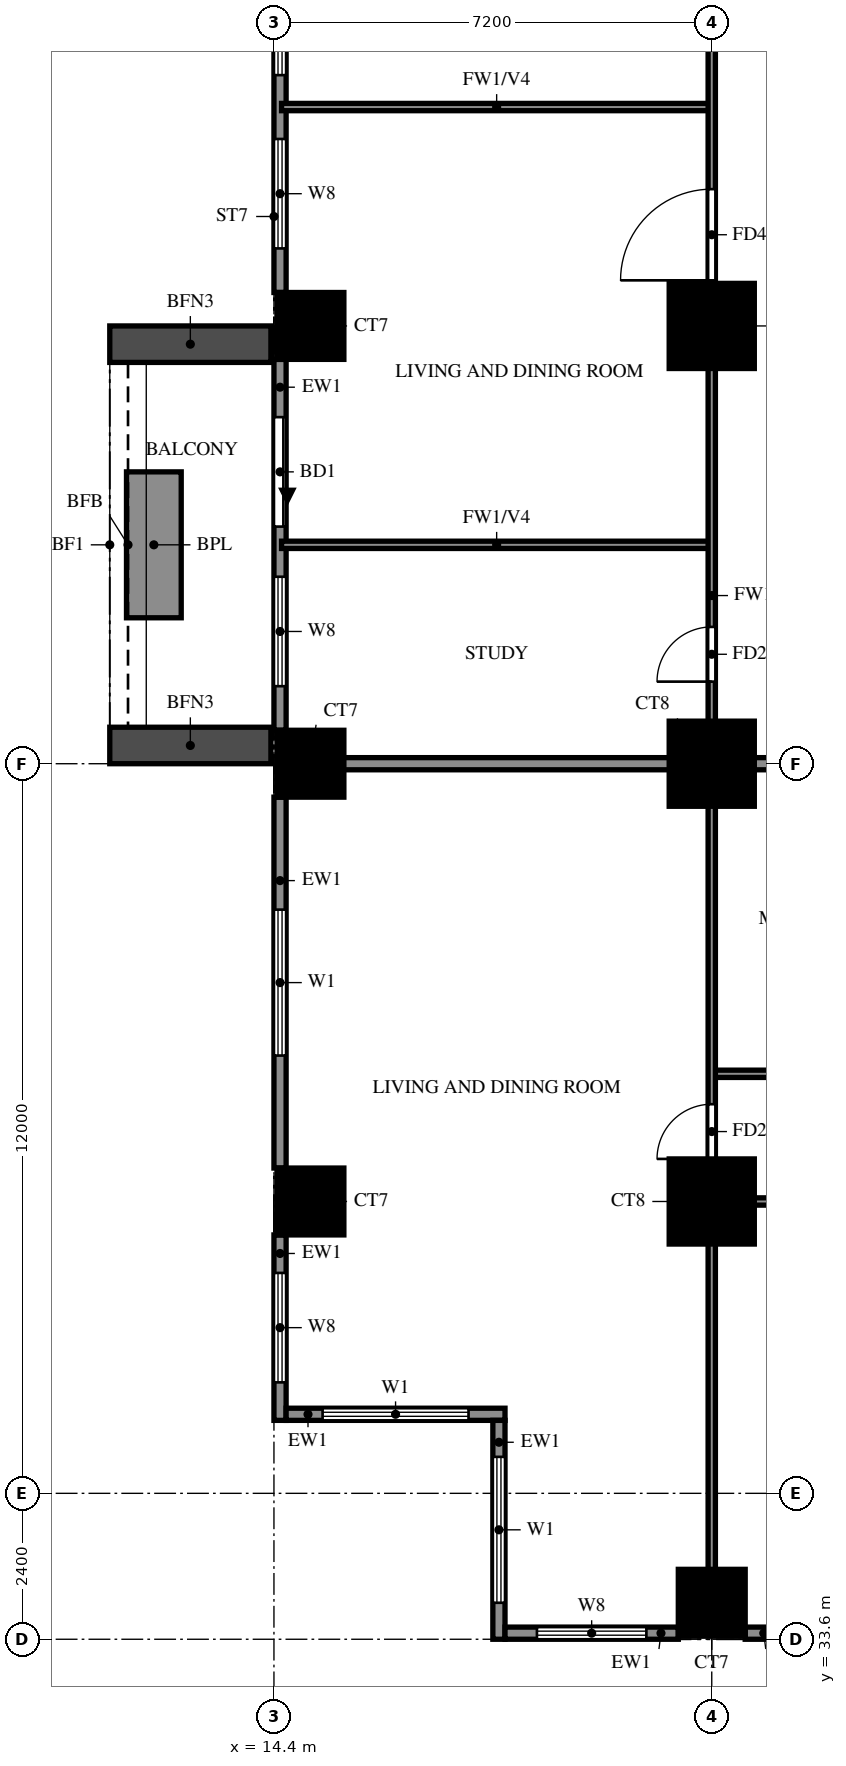
"""IFC4 building model, lengths in metres.
Left out: names, types, materials, properties, quantities, classifications, styles, units other than length and angle.
Written with IfcOpenShell. Run it as: python <this file> out.ifc"""

import sys

from ifc_helpers import new_model, si_unit, direction, frame, frame_2d, origin, origin_2d, place, context, subcontext, project, spatial, rectangle, extrude, source, transform, mapped, element, fill, save


model = new_model("IFC4")
c1 = context("Model", 3, precision=1e-05, world=origin(), true_north=direction((0.0, 1.0)))
c2 = subcontext(c1, "Body", "Model", "MODEL_VIEW")
j1 = project(units=[si_unit("LENGTHUNIT", "METRE"), si_unit("PLANEANGLEUNIT", "RADIAN")], contexts=[c1])
p1 = place(None, origin())
s1 = spatial("IfcSite", under=j1, at=p1, CompositionType="ELEMENT")
p2 = place(p1, origin())
s2 = spatial("IfcBuilding", under=s1, at=p2, CompositionType="ELEMENT")
p3 = place(p2, frame((0.0, 0.0, 37.5)))
s3 = spatial("IfcBuildingStorey", under=s2, at=p3, CompositionType="ELEMENT", Elevation=37.5)
m1 = source(origin(), c2, "Body", "SweptSolid", [
    extrude(rectangle(XDim=1.1, YDim=1.1, at=origin_2d()), origin(), (0.0, 0.0, 1.0), 3.18),
])
for number, where, z_axis, x_axis in (
    (1, (21.6, 34.2, 0.0), (0.0, 0.0, 1.0), (1.0, 0.0, 0.0)),
    (2, (15.0, 40.8, 0.0), (0.0, 0.0, 1.0), (1.0, 0.0, 0.0)),
):
    element("IfcColumn", number, at=place(p3, frame(where, z_axis=z_axis, x_axis=x_axis)), inside=s3, PredefinedType="COLUMN", context=c2, shape_type="MappedRepresentation", body=[
        mapped(m1, transform((0.0, 0.0, 0.0))),
    ])
m2 = source(origin(), c2, "Body", "SweptSolid", [
    extrude(rectangle(XDim=1.4, YDim=1.4, at=origin_2d()), origin(), (0.0, 0.0, 1.0), 3.18),
])
p4 = place(p3, frame((21.6, 40.8, 0.0), z_axis=(0.0, 0.0, 1.0), x_axis=(1.0, 0.0, 0.0)))
e3 = element("IfcColumn", 3, at=p4, inside=s3, PredefinedType="COLUMN", context=c2, shape_type="MappedRepresentation", body=[
    mapped(m2, transform((0.0, 0.0, 0.0))),
])
p5 = place(p3, frame((15.0, 48.0, 0.0), z_axis=(0.0, 0.0, 1.0), x_axis=(1.0, 0.0, 0.0)))
e4 = element("IfcColumn", 4, at=p5, inside=s3, PredefinedType="COLUMN", context=c2, shape_type="MappedRepresentation", body=[
    mapped(m1, transform((0.0, 0.0, 0.0))),
])
p6 = place(p3, frame((21.6, 48.0, 0.0), z_axis=(0.0, 0.0, 1.0), x_axis=(1.0, 0.0, 0.0)))
e5 = element("IfcColumn", 5, at=p6, inside=s3, PredefinedType="COLUMN", context=c2, shape_type="MappedRepresentation", body=[
    mapped(m2, transform((0.0, 0.0, 0.0))),
])
p7 = place(p3, frame((15.0, 55.2, 0.0), z_axis=(0.0, 0.0, 1.0), x_axis=(1.0, 0.0, 0.0)))
e6 = element("IfcColumn", 6, at=p7, inside=s3, PredefinedType="COLUMN", context=c2, shape_type="MappedRepresentation", body=[
    mapped(m1, transform((0.0, 0.0, 0.0))),
])
p8 = place(p3, frame((21.6, 55.2, 0.0), z_axis=(0.0, 0.0, 1.0), x_axis=(1.0, 0.0, 0.0)))
e7 = element("IfcColumn", 7, at=p8, inside=s3, PredefinedType="COLUMN", context=c2, shape_type="MappedRepresentation", body=[
    mapped(m2, transform((0.0, 0.0, 0.0))),
])
p9 = place(p3, frame((14.5, 61.85, 0.0), z_axis=(0.0, 0.0, 1.0), x_axis=(0.0, -1.0, 0.0)))
e8 = element("IfcWall", 8, at=p9, inside=s3, PredefinedType="SOLIDWALL", context=c2, shape_type="SweptSolid", body=[
    extrude(rectangle(XDim=6.1, YDim=0.2, at=frame_2d((3.05, 0.0))), origin(), (0.0, 0.0, 1.0), 3.18),
])
p10 = place(p9, frame((3.575, 0.0, 0.6)))
e9 = element("IfcOpeningElement", 9, at=p10, cuts=e8, PredefinedType="OPENING", context=c2, shape_type="SweptSolid", body=[
    extrude(rectangle(XDim=1.8, YDim=2.4, at=frame_2d((0.9, 1.2))), frame((0.0, 0.11, 0.0), z_axis=(0.0, -1.0, 0.0), x_axis=(1.0, 0.0, 0.0)), (0.0, 0.0, 1.0), 0.22),
])
p11 = place(p9, frame((0.725, 0.0, 0.6)))
e10 = element("IfcOpeningElement", 10, at=p11, cuts=e8, PredefinedType="OPENING", context=c2, shape_type="SweptSolid", body=[
    extrude(rectangle(XDim=1.8, YDim=2.4, at=frame_2d((0.9, 1.2))), frame((0.0, 0.11, 0.0), z_axis=(0.0, -1.0, 0.0), x_axis=(1.0, 0.0, 0.0)), (0.0, 0.0, 1.0), 0.22),
])
p12 = place(p3, frame((14.5, 54.65, 0.0), z_axis=(0.0, 0.0, 1.0), x_axis=(0.0, -1.0, 0.0)))
e11 = element("IfcWall", 11, at=p12, inside=s3, PredefinedType="SOLIDWALL", context=c2, shape_type="SweptSolid", body=[
    extrude(rectangle(XDim=6.1, YDim=0.2, at=frame_2d((3.05, 0.0))), origin(), (0.0, 0.0, 1.0), 3.18),
])
p13 = place(p12, frame((0.95, 0.0, 0.0)))
e12 = element("IfcOpeningElement", 12, at=p13, cuts=e11, PredefinedType="OPENING", context=c2, shape_type="SweptSolid", body=[
    extrude(rectangle(XDim=1.8, YDim=2.4, at=frame_2d((0.9, 1.2))), frame((0.0, 0.11, 0.0), z_axis=(0.0, -1.0, 0.0), x_axis=(1.0, 0.0, 0.0)), (0.0, 0.0, 1.0), 0.22),
])
p14 = place(p12, frame((3.575, 0.0, 0.6)))
e13 = element("IfcOpeningElement", 13, at=p14, cuts=e11, PredefinedType="OPENING", context=c2, shape_type="SweptSolid", body=[
    extrude(rectangle(XDim=1.8, YDim=2.4, at=frame_2d((0.9, 1.2))), frame((0.0, 0.11, 0.0), z_axis=(0.0, -1.0, 0.0), x_axis=(1.0, 0.0, 0.0)), (0.0, 0.0, 1.0), 0.22),
])
p15 = place(p3, frame((14.5, 47.45, 0.0), z_axis=(0.0, 0.0, 1.0), x_axis=(0.0, -1.0, 0.0)))
e14 = element("IfcWall", 14, at=p15, inside=s3, PredefinedType="SOLIDWALL", context=c2, shape_type="SweptSolid", body=[
    extrude(rectangle(XDim=6.1, YDim=0.2, at=frame_2d((3.05, 0.0))), origin(), (0.0, 0.0, 1.0), 3.18),
])
p16 = place(p15, frame((1.85, 0.0, 0.6)))
e15 = element("IfcOpeningElement", 15, at=p16, cuts=e14, PredefinedType="OPENING", context=c2, shape_type="SweptSolid", body=[
    extrude(rectangle(XDim=2.4, YDim=2.4, at=frame_2d((1.2, 1.2))), frame((0.0, 0.11, 0.0), z_axis=(0.0, -1.0, 0.0), x_axis=(1.0, 0.0, 0.0)), (0.0, 0.0, 1.0), 0.22),
])
p17 = place(p3, frame((14.5, 40.25, 0.0), z_axis=(0.0, 0.0, 1.0), x_axis=(0.0, -1.0, 0.0)))
e16 = element("IfcWall", 16, at=p17, inside=s3, PredefinedType="SOLIDWALL", context=c2, shape_type="SweptSolid", body=[
    extrude(rectangle(XDim=3.05, YDim=0.2, at=frame_2d((1.525, 0.0))), origin(), (0.0, 0.0, 1.0), 3.18),
])
p18 = place(p17, frame((0.625, 0.0, 0.6)))
e17 = element("IfcOpeningElement", 17, at=p18, cuts=e16, PredefinedType="OPENING", context=c2, shape_type="SweptSolid", body=[
    extrude(rectangle(XDim=1.8, YDim=2.4, at=frame_2d((0.9, 1.2))), frame((0.0, 0.11, 0.0), z_axis=(0.0, -1.0, 0.0), x_axis=(1.0, 0.0, 0.0)), (0.0, 0.0, 1.0), 0.22),
])
p19 = place(p3, frame((14.6, 37.3, 0.0), z_axis=(0.0, 0.0, 1.0), x_axis=(1.0, 0.0, 0.0)))
e18 = element("IfcWall", 18, at=p19, inside=s3, PredefinedType="SOLIDWALL", context=c2, shape_type="SweptSolid", body=[
    extrude(rectangle(XDim=3.6, YDim=0.2, at=frame_2d((1.8, 0.0))), origin(), (0.0, 0.0, 1.0), 3.18),
])
p20 = place(p19, frame((0.6, 0.0, 0.6)))
e19 = element("IfcOpeningElement", 19, at=p20, cuts=e18, PredefinedType="OPENING", context=c2, shape_type="SweptSolid", body=[
    extrude(rectangle(XDim=2.4, YDim=2.4, at=frame_2d((1.2, 1.2))), frame((0.0, 0.11, 0.0), z_axis=(0.0, -1.0, 0.0), x_axis=(1.0, 0.0, 0.0)), (0.0, 0.0, 1.0), 0.22),
])
p21 = place(p3, frame((18.1, 37.2, 0.0), z_axis=(0.0, 0.0, 1.0), x_axis=(0.0, -1.0, 0.0)))
e20 = element("IfcWall", 20, at=p21, inside=s3, PredefinedType="SOLIDWALL", context=c2, shape_type="SweptSolid", body=[
    extrude(rectangle(XDim=3.6, YDim=0.2, at=frame_2d((1.8, 0.0))), origin(), (0.0, 0.0, 1.0), 3.18),
])
p22 = place(p21, frame((0.6, 0.0, 0.6)))
e21 = element("IfcOpeningElement", 21, at=p22, cuts=e20, PredefinedType="OPENING", context=c2, shape_type="SweptSolid", body=[
    extrude(rectangle(XDim=2.4, YDim=2.4, at=frame_2d((1.2, 1.2))), frame((0.0, 0.11, 0.0), z_axis=(0.0, -1.0, 0.0), x_axis=(1.0, 0.0, 0.0)), (0.0, 0.0, 1.0), 0.22),
])
p23 = place(p3, frame((18.2, 33.7, 0.0), z_axis=(0.0, 0.0, 1.0), x_axis=(1.0, 0.0, 0.0)))
e22 = element("IfcWall", 22, at=p23, inside=s3, PredefinedType="SOLIDWALL", context=c2, shape_type="SweptSolid", body=[
    extrude(rectangle(XDim=2.85, YDim=0.2, at=frame_2d((1.425, 0.0))), origin(), (0.0, 0.0, 1.0), 3.18),
])
p24 = place(p23, frame((0.525, 0.0, 0.6)))
e23 = element("IfcOpeningElement", 23, at=p24, cuts=e22, PredefinedType="OPENING", context=c2, shape_type="SweptSolid", body=[
    extrude(rectangle(XDim=1.8, YDim=2.4, at=frame_2d((0.9, 1.2))), frame((0.0, 0.11, 0.0), z_axis=(0.0, -1.0, 0.0), x_axis=(1.0, 0.0, 0.0)), (0.0, 0.0, 1.0), 0.22),
])
p25 = place(p3, frame((22.15, 33.7, 0.0), z_axis=(0.0, 0.0, 1.0), x_axis=(1.0, 0.0, 0.0)))
e24 = element("IfcWall", 24, at=p25, inside=s3, PredefinedType="SOLIDWALL", context=c2, shape_type="SweptSolid", body=[
    extrude(rectangle(XDim=6.1, YDim=0.2, at=frame_2d((3.05, 0.0))), origin(), (0.0, 0.0, 1.0), 3.18),
])
p26 = place(p25, frame((0.725, 0.0, 0.6)))
e25 = element("IfcOpeningElement", 25, at=p26, cuts=e24, PredefinedType="OPENING", context=c2, shape_type="SweptSolid", body=[
    extrude(rectangle(XDim=1.8, YDim=2.4, at=frame_2d((0.9, 1.2))), frame((0.0, 0.11, 0.0), z_axis=(0.0, -1.0, 0.0), x_axis=(1.0, 0.0, 0.0)), (0.0, 0.0, 1.0), 0.22),
])
p27 = place(p25, frame((3.575, 0.0, 0.6)))
e26 = element("IfcOpeningElement", 26, at=p27, cuts=e24, PredefinedType="OPENING", context=c2, shape_type="SweptSolid", body=[
    extrude(rectangle(XDim=1.8, YDim=2.4, at=frame_2d((0.9, 1.2))), frame((0.0, 0.11, 0.0), z_axis=(0.0, -1.0, 0.0), x_axis=(1.0, 0.0, 0.0)), (0.0, 0.0, 1.0), 0.22),
])
for number, where, z_axis, x_axis in (
    (27, (14.35, 54.9, 0.0), (0.0, 0.0, 1.0), (-1.0, 0.0, 0.0)),
    (28, (14.35, 48.3, 0.0), (0.0, 0.0, 1.0), (-1.0, 0.0, 0.0)),
):
    element("IfcWall", number, at=place(p3, frame(where, z_axis=z_axis, x_axis=x_axis)), inside=s3, PredefinedType="SOLIDWALL", context=c2, shape_type="SweptSolid", body=[
        extrude(rectangle(XDim=2.65, YDim=0.6, at=frame_2d((1.325, 0.0))), origin(), (0.0, 0.0, 1.0), 2.85),
    ])
p28 = place(p3, frame((12.425, 52.8, 0.0), z_axis=(0.0, 0.0, 1.0), x_axis=(0.0, -1.0, 0.0)))
e29 = element("IfcWall", 29, at=p28, inside=s3, PredefinedType="SOLIDWALL", context=c2, shape_type="SweptSolid", body=[
    extrude(rectangle(XDim=2.4, YDim=0.9, at=frame_2d((1.2, 0.0))), origin(), (0.0, 0.0, 1.0), 0.9),
])
p29 = place(p3, frame((14.525, 48.0, 0.0), z_axis=(0.0, 0.0, 1.0), x_axis=(1.0, 0.0, 0.0)))
e30 = element("IfcWall", 30, at=p29, inside=s3, PredefinedType="SOLIDWALL", context=c2, shape_type="SweptSolid", body=[
    extrude(rectangle(XDim=19.075, YDim=0.2, at=frame_2d((9.538, 0.0))), origin(), (0.0, 0.0, 1.0), 3.18),
])
p30 = place(p3, frame((21.6, 40.8, 0.0), z_axis=(0.0, 0.0, 1.0), x_axis=(1.0, 0.0, 0.0)))
e31 = element("IfcWall", 31, at=p30, inside=s3, PredefinedType="PARTITIONING", context=c2, shape_type="SweptSolid", body=[
    extrude(rectangle(XDim=7.2, YDim=0.12, at=frame_2d((3.6, 0.0))), origin(), (0.0, 0.0, 1.0), 3.18),
])
p31 = place(p30, frame((1.35, 0.0, 0.0)))
e32 = element("IfcOpeningElement", 32, at=p31, cuts=e31, PredefinedType="OPENING", context=c2, shape_type="SweptSolid", body=[
    extrude(rectangle(XDim=0.9, YDim=2.1, at=frame_2d((0.45, 1.05))), frame((0.0, 0.07, 0.0), z_axis=(0.0, -1.0, 0.0), x_axis=(1.0, 0.0, 0.0)), (0.0, 0.0, 1.0), 0.14),
])
p32 = place(p30, frame((4.95, 0.0, 0.0)))
e33 = element("IfcOpeningElement", 33, at=p32, cuts=e31, PredefinedType="OPENING", context=c2, shape_type="SweptSolid", body=[
    extrude(rectangle(XDim=0.9, YDim=2.1, at=frame_2d((0.45, 1.05))), frame((0.0, 0.07, 0.0), z_axis=(0.0, -1.0, 0.0), x_axis=(1.0, 0.0, 0.0)), (0.0, 0.0, 1.0), 0.14),
])
p33 = place(p3, frame((21.6, 42.9, 0.0), z_axis=(0.0, 0.0, 1.0), x_axis=(1.0, 0.0, 0.0)))
e34 = element("IfcWall", 34, at=p33, inside=s3, PredefinedType="PARTITIONING", context=c2, shape_type="SweptSolid", body=[
    extrude(rectangle(XDim=15.6, YDim=0.12, at=frame_2d((7.8, 0.0))), origin(), (0.0, 0.0, 1.0), 3.18),
])
p34 = place(p33, frame((1.375, 0.0, 0.0)))
e35 = element("IfcOpeningElement", 35, at=p34, cuts=e34, PredefinedType="OPENING", context=c2, shape_type="SweptSolid", body=[
    extrude(rectangle(XDim=0.9, YDim=2.1, at=frame_2d((0.45, 1.05))), frame((0.0, 0.07, 0.0), z_axis=(0.0, -1.0, 0.0), x_axis=(1.0, 0.0, 0.0)), (0.0, 0.0, 1.0), 0.14),
])
p35 = place(p33, frame((5.5, 0.0, 0.0)))
e36 = element("IfcOpeningElement", 36, at=p35, cuts=e34, PredefinedType="OPENING", context=c2, shape_type="SweptSolid", body=[
    extrude(rectangle(XDim=0.9, YDim=2.1, at=frame_2d((0.45, 1.05))), frame((0.0, 0.07, 0.0), z_axis=(0.0, -1.0, 0.0), x_axis=(1.0, 0.0, 0.0)), (0.0, 0.0, 1.0), 0.14),
])
p36 = place(p33, frame((9.725, 0.0, 0.0)))
e37 = element("IfcOpeningElement", 37, at=p36, cuts=e34, PredefinedType="OPENING", context=c2, shape_type="SweptSolid", body=[
    extrude(rectangle(XDim=0.8, YDim=2.1, at=frame_2d((0.4, 1.05))), frame((0.0, 0.07, 0.0), z_axis=(0.0, -1.0, 0.0), x_axis=(1.0, 0.0, 0.0)), (0.0, 0.0, 1.0), 0.14),
])
p37 = place(p33, frame((13.35, 0.0, 0.0)))
e38 = element("IfcOpeningElement", 38, at=p37, cuts=e34, PredefinedType="OPENING", context=c2, shape_type="SweptSolid", body=[
    extrude(rectangle(XDim=0.9, YDim=2.1, at=frame_2d((0.45, 1.05))), frame((0.0, 0.07, 0.0), z_axis=(0.0, -1.0, 0.0), x_axis=(1.0, 0.0, 0.0)), (0.0, 0.0, 1.0), 0.14),
])
for number, where, z_axis, x_axis in (
    (39, (14.525, 51.6, 0.0), (0.0, 0.0, 1.0), (1.0, 0.0, 0.0)),
    (40, (14.525, 58.8, 0.0), (0.0, 0.0, 1.0), (1.0, 0.0, 0.0)),
):
    element("IfcWall", number, at=place(p3, frame(where, z_axis=z_axis, x_axis=x_axis)), inside=s3, PredefinedType="PARTITIONING", context=c2, shape_type="SweptSolid", body=[
        extrude(rectangle(XDim=7.075, YDim=0.12, at=frame_2d((3.538, 0.0))), origin(), (0.0, 0.0, 1.0), 2.28),
    ])
p38 = place(p3, frame((21.6, 33.725, 0.0), z_axis=(0.0, 0.0, 1.0), x_axis=(0.0, 1.0, 0.0)))
e41 = element("IfcWall", 41, at=p38, inside=s3, PredefinedType="PARTITIONING", context=c2, shape_type="SweptSolid", body=[
    extrude(rectangle(XDim=35.875, YDim=0.12, at=frame_2d((17.938, 0.0))), origin(), (0.0, 0.0, 1.0), 3.18),
])
p39 = place(p38, frame((7.775, 0.0, 0.0)))
e42 = element("IfcOpeningElement", 42, at=p39, cuts=e41, PredefinedType="OPENING", context=c2, shape_type="SweptSolid", body=[
    extrude(rectangle(XDim=0.9, YDim=2.1, at=frame_2d((0.45, 1.05))), frame((0.0, 0.07, 0.0), z_axis=(0.0, -1.0, 0.0), x_axis=(1.0, 0.0, 0.0)), (0.0, 0.0, 1.0), 0.14),
])
p40 = place(p38, frame((15.625, 0.0, 0.0)))
e43 = element("IfcOpeningElement", 43, at=p40, cuts=e41, PredefinedType="OPENING", context=c2, shape_type="SweptSolid", body=[
    extrude(rectangle(XDim=0.9, YDim=2.1, at=frame_2d((0.45, 1.05))), frame((0.0, 0.07, 0.0), z_axis=(0.0, -1.0, 0.0), x_axis=(1.0, 0.0, 0.0)), (0.0, 0.0, 1.0), 0.14),
])
p41 = place(p38, frame((22.225, 0.0, 0.0)))
e44 = element("IfcOpeningElement", 44, at=p41, cuts=e41, PredefinedType="OPENING", context=c2, shape_type="SweptSolid", body=[
    extrude(rectangle(XDim=1.5, YDim=2.1, at=frame_2d((0.75, 1.05))), frame((0.0, 0.07, 0.0), z_axis=(0.0, -1.0, 0.0), x_axis=(1.0, 0.0, 0.0)), (0.0, 0.0, 1.0), 0.14),
])
p42 = place(p38, frame((26.425, 0.0, 0.0)))
e45 = element("IfcOpeningElement", 45, at=p42, cuts=e41, PredefinedType="OPENING", context=c2, shape_type="SweptSolid", body=[
    extrude(rectangle(XDim=0.9, YDim=2.1, at=frame_2d((0.45, 1.05))), frame((0.0, 0.07, 0.0), z_axis=(0.0, -1.0, 0.0), x_axis=(1.0, 0.0, 0.0)), (0.0, 0.0, 1.0), 0.14),
])
p43 = place(p38, frame((30.025, 0.0, 0.0)))
e46 = element("IfcOpeningElement", 46, at=p43, cuts=e41, PredefinedType="OPENING", context=c2, shape_type="SweptSolid", body=[
    extrude(rectangle(XDim=0.9, YDim=2.1, at=frame_2d((0.45, 1.05))), frame((0.0, 0.07, 0.0), z_axis=(0.0, -1.0, 0.0), x_axis=(1.0, 0.0, 0.0)), (0.0, 0.0, 1.0), 0.14),
])
p44 = place(p38, frame((33.625, 0.0, 0.0)))
e47 = element("IfcOpeningElement", 47, at=p44, cuts=e41, PredefinedType="OPENING", context=c2, shape_type="SweptSolid", body=[
    extrude(rectangle(XDim=0.9, YDim=2.1, at=frame_2d((0.45, 1.05))), frame((0.0, 0.07, 0.0), z_axis=(0.0, -1.0, 0.0), x_axis=(1.0, 0.0, 0.0)), (0.0, 0.0, 1.0), 0.14),
])
p45 = place(p10, origin())
e48 = element("IfcWindow", 48, at=p45, inside=s3, PartitioningType="DOUBLE_PANEL_VERTICAL", PredefinedType="WINDOW", context=c2, shape_type="SweptSolid", body=[
    extrude(rectangle(XDim=1.8, YDim=2.4, at=frame_2d((0.9, 1.2))), frame((0.0, 0.03, 0.0), z_axis=(0.0, -1.0, 0.0), x_axis=(1.0, 0.0, 0.0)), (0.0, 0.0, 1.0), 0.06),
])
fill(e9, e48)
p46 = place(p11, origin())
e49 = element("IfcWindow", 49, at=p46, inside=s3, PartitioningType="DOUBLE_PANEL_VERTICAL", PredefinedType="WINDOW", context=c2, shape_type="SweptSolid", body=[
    extrude(rectangle(XDim=1.8, YDim=2.4, at=frame_2d((0.9, 1.2))), frame((0.0, 0.03, 0.0), z_axis=(0.0, -1.0, 0.0), x_axis=(1.0, 0.0, 0.0)), (0.0, 0.0, 1.0), 0.06),
])
fill(e10, e49)
p47 = place(p13, origin())
e50 = element("IfcDoor", 50, at=p47, inside=s3, OperationType="DOUBLE_DOOR_SLIDING", PredefinedType="DOOR", context=c2, shape_type="SweptSolid", body=[
    extrude(rectangle(XDim=1.8, YDim=2.4, at=frame_2d((0.9, 1.2))), frame((0.0, 0.025, 0.0), z_axis=(0.0, -1.0, 0.0), x_axis=(1.0, 0.0, 0.0)), (0.0, 0.0, 1.0), 0.05),
])
fill(e12, e50)
p48 = place(p14, origin())
e51 = element("IfcWindow", 51, at=p48, inside=s3, PartitioningType="DOUBLE_PANEL_VERTICAL", PredefinedType="WINDOW", context=c2, shape_type="SweptSolid", body=[
    extrude(rectangle(XDim=1.8, YDim=2.4, at=frame_2d((0.9, 1.2))), frame((0.0, 0.03, 0.0), z_axis=(0.0, -1.0, 0.0), x_axis=(1.0, 0.0, 0.0)), (0.0, 0.0, 1.0), 0.06),
])
fill(e13, e51)
p49 = place(p16, origin())
e52 = element("IfcWindow", 52, at=p49, inside=s3, PartitioningType="DOUBLE_PANEL_VERTICAL", PredefinedType="WINDOW", context=c2, shape_type="SweptSolid", body=[
    extrude(rectangle(XDim=2.4, YDim=2.4, at=frame_2d((1.2, 1.2))), frame((0.0, 0.03, 0.0), z_axis=(0.0, -1.0, 0.0), x_axis=(1.0, 0.0, 0.0)), (0.0, 0.0, 1.0), 0.06),
])
fill(e15, e52)
p50 = place(p18, origin())
e53 = element("IfcWindow", 53, at=p50, inside=s3, PartitioningType="DOUBLE_PANEL_VERTICAL", PredefinedType="WINDOW", context=c2, shape_type="SweptSolid", body=[
    extrude(rectangle(XDim=1.8, YDim=2.4, at=frame_2d((0.9, 1.2))), frame((0.0, 0.03, 0.0), z_axis=(0.0, -1.0, 0.0), x_axis=(1.0, 0.0, 0.0)), (0.0, 0.0, 1.0), 0.06),
])
fill(e17, e53)
p51 = place(p20, origin())
e54 = element("IfcWindow", 54, at=p51, inside=s3, PartitioningType="DOUBLE_PANEL_VERTICAL", PredefinedType="WINDOW", context=c2, shape_type="SweptSolid", body=[
    extrude(rectangle(XDim=2.4, YDim=2.4, at=frame_2d((1.2, 1.2))), frame((0.0, 0.03, 0.0), z_axis=(0.0, -1.0, 0.0), x_axis=(1.0, 0.0, 0.0)), (0.0, 0.0, 1.0), 0.06),
])
fill(e19, e54)
p52 = place(p22, origin())
e55 = element("IfcWindow", 55, at=p52, inside=s3, PartitioningType="DOUBLE_PANEL_VERTICAL", PredefinedType="WINDOW", context=c2, shape_type="SweptSolid", body=[
    extrude(rectangle(XDim=2.4, YDim=2.4, at=frame_2d((1.2, 1.2))), frame((0.0, 0.03, 0.0), z_axis=(0.0, -1.0, 0.0), x_axis=(1.0, 0.0, 0.0)), (0.0, 0.0, 1.0), 0.06),
])
fill(e21, e55)
p53 = place(p24, origin())
e56 = element("IfcWindow", 56, at=p53, inside=s3, PartitioningType="DOUBLE_PANEL_VERTICAL", PredefinedType="WINDOW", context=c2, shape_type="SweptSolid", body=[
    extrude(rectangle(XDim=1.8, YDim=2.4, at=frame_2d((0.9, 1.2))), frame((0.0, 0.03, 0.0), z_axis=(0.0, -1.0, 0.0), x_axis=(1.0, 0.0, 0.0)), (0.0, 0.0, 1.0), 0.06),
])
fill(e23, e56)
p54 = place(p39, origin())
e57 = element("IfcDoor", 57, at=p54, inside=s3, OperationType="SINGLE_SWING_LEFT", PredefinedType="DOOR", context=c2, shape_type="SweptSolid", body=[
    extrude(rectangle(XDim=0.9, YDim=2.1, at=frame_2d((0.45, 1.05))), frame((0.0, 0.025, 0.0), z_axis=(0.0, -1.0, 0.0), x_axis=(1.0, 0.0, 0.0)), (0.0, 0.0, 1.0), 0.05),
])
fill(e42, e57)
p55 = place(p40, origin())
e58 = element("IfcDoor", 58, at=p55, inside=s3, OperationType="SINGLE_SWING_LEFT", PredefinedType="DOOR", context=c2, shape_type="SweptSolid", body=[
    extrude(rectangle(XDim=0.9, YDim=2.1, at=frame_2d((0.45, 1.05))), frame((0.0, 0.025, 0.0), z_axis=(0.0, -1.0, 0.0), x_axis=(1.0, 0.0, 0.0)), (0.0, 0.0, 1.0), 0.05),
])
fill(e43, e58)
p56 = place(p41, origin())
e59 = element("IfcDoor", 59, at=p56, inside=s3, OperationType="SINGLE_SWING_LEFT", PredefinedType="DOOR", context=c2, shape_type="SweptSolid", body=[
    extrude(rectangle(XDim=1.5, YDim=2.1, at=frame_2d((0.75, 1.05))), frame((0.0, 0.025, 0.0), z_axis=(0.0, -1.0, 0.0), x_axis=(1.0, 0.0, 0.0)), (0.0, 0.0, 1.0), 0.05),
])
fill(e44, e59)
save(model, sys.argv[1])
